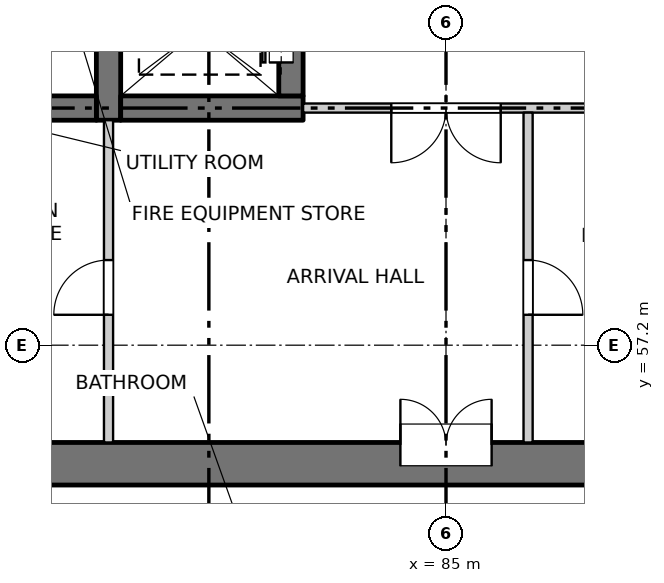
"""IFC4 building model, lengths in metres.
Left out: names, types, materials, properties, quantities, classifications, styles, units other than length and angle.
Written with IfcOpenShell. Run it as: python <this file> out.ifc"""

import sys

from ifc_helpers import new_model, si_unit, direction, frame, frame_2d, origin, place, context, subcontext, project, spatial, rectangle, extrude, element, fill, save


model = new_model("IFC4")
c1 = context("Model", 3, precision=1e-05, world=origin(), true_north=direction((0.0, 1.0)))
c2 = subcontext(c1, "Body", "Model", "MODEL_VIEW")
j1 = project(units=[si_unit("LENGTHUNIT", "METRE"), si_unit("PLANEANGLEUNIT", "RADIAN")], contexts=[c1])
p1 = place(None, origin())
s1 = spatial("IfcSite", under=j1, at=p1, CompositionType="ELEMENT")
p2 = place(p1, origin())
s2 = spatial("IfcBuilding", under=s1, at=p2, CompositionType="ELEMENT")
p3 = place(p2, frame((0.0, 0.0, 29.7)))
s3 = spatial("IfcBuildingStorey", under=s2, at=p3, CompositionType="ELEMENT", Elevation=29.7)
p4 = place(p3, frame((75.6, 55.25, -0.25), z_axis=(0.0, 0.0, 1.0), x_axis=(1.0, 0.0, 0.0)))
e1 = element("IfcWall", 1, at=p4, inside=s3, PredefinedType="SOLIDWALL", context=c2, shape_type="SweptSolid", body=[
    extrude(rectangle(XDim=18.8, YDim=0.7, at=frame_2d((9.4, 0.0))), origin(), (0.0, 0.0, 1.0), 3.4),
])
p5 = place(p4, frame((8.65, 0.0, 0.25)))
e2 = element("IfcOpeningElement", 2, at=p5, cuts=e1, PredefinedType="OPENING", context=c2, shape_type="SweptSolid", body=[
    extrude(rectangle(XDim=1.5, YDim=2.1, at=frame_2d((0.75, 1.05))), frame((0.0, 0.36, 0.0), z_axis=(0.0, -1.0, 0.0), x_axis=(1.0, 0.0, 0.0)), (0.0, 0.0, 1.0), 0.72),
])
p6 = place(p3, frame((79.45, 60.9, -0.25), z_axis=(0.0, 0.0, 1.0), x_axis=(0.0, 1.0, 0.0)))
e3 = element("IfcWall", 3, at=p6, inside=s3, PredefinedType="SOLIDWALL", context=c2, shape_type="SweptSolid", body=[
    extrude(rectangle(XDim=16.4, YDim=0.4, at=frame_2d((8.2, 0.0))), origin(), (0.0, 0.0, 1.0), 3.4),
])
p7 = place(p3, frame((79.65, 61.1, -0.25), z_axis=(0.0, 0.0, 1.0), x_axis=(1.0, 0.0, 0.0)))
e4 = element("IfcWall", 4, at=p7, inside=s3, PredefinedType="SOLIDWALL", context=c2, shape_type="SweptSolid", body=[
    extrude(rectangle(XDim=3.0, YDim=0.4, at=frame_2d((1.5, 0.0))), origin(), (0.0, 0.0, 1.0), 3.4),
])
p8 = place(p3, frame((82.45, 61.3, -0.25), z_axis=(0.0, 0.0, 1.0), x_axis=(0.0, 1.0, 0.0)))
e5 = element("IfcWall", 5, at=p8, inside=s3, PredefinedType="SOLIDWALL", context=c2, shape_type="SweptSolid", body=[
    extrude(rectangle(XDim=2.2, YDim=0.4, at=frame_2d((1.1, 0.0))), origin(), (0.0, 0.0, 1.0), 3.4),
])
p9 = place(p8, frame((0.55, 0.0, 0.25)))
e6 = element("IfcOpeningElement", 6, at=p9, cuts=e5, PredefinedType="OPENING", context=c2, shape_type="SweptSolid", body=[
    extrude(rectangle(XDim=1.1, YDim=2.1, at=frame_2d((0.55, 1.05))), frame((0.0, 0.21, 0.0), z_axis=(0.0, -1.0, 0.0), x_axis=(1.0, 0.0, 0.0)), (0.0, 0.0, 1.0), 0.42),
])
p10 = place(p3, frame((75.6, 61.1, -0.25), z_axis=(0.0, 0.0, 1.0), x_axis=(1.0, 0.0, 0.0)))
e7 = element("IfcWall", 7, at=p10, inside=s3, PredefinedType="SOLIDWALL", context=c2, shape_type="SweptSolid", body=[
    extrude(rectangle(XDim=3.65, YDim=0.4, at=frame_2d((1.825, 0.0))), origin(), (0.0, 0.0, 1.0), 3.4),
])
p11 = place(p3, frame((82.65, 61.1, 0.0), z_axis=(0.0, 0.0, 1.0), x_axis=(1.0, 0.0, 0.0)))
e8 = element("IfcWall", 8, at=p11, inside=s3, PredefinedType="PARTITIONING", context=c2, shape_type="SweptSolid", body=[
    extrude(rectangle(XDim=4.7, YDim=0.15, at=frame_2d((2.35, 0.0))), origin(), (0.0, 0.0, 1.0), 3.15),
])
p12 = place(p11, frame((1.45, 0.0, 0.0)))
e9 = element("IfcOpeningElement", 9, at=p12, cuts=e8, PredefinedType="OPENING", context=c2, shape_type="SweptSolid", body=[
    extrude(rectangle(XDim=1.8, YDim=2.1, at=frame_2d((0.9, 1.05))), frame((0.0, 0.085, 0.0), z_axis=(0.0, -1.0, 0.0), x_axis=(1.0, 0.0, 0.0)), (0.0, 0.0, 1.0), 0.17),
])
p13 = place(p3, frame((79.45, 55.6, 0.0), z_axis=(0.0, 0.0, 1.0), x_axis=(0.0, 1.0, 0.0)))
e10 = element("IfcWall", 10, at=p13, inside=s3, PredefinedType="PARTITIONING", context=c2, shape_type="SweptSolid", body=[
    extrude(rectangle(XDim=5.3, YDim=0.15, at=frame_2d((2.65, 0.0))), origin(), (0.0, 0.0, 1.0), 3.15),
])
p14 = place(p13, frame((2.1, 0.0, 0.0)))
e11 = element("IfcOpeningElement", 11, at=p14, cuts=e10, PredefinedType="OPENING", context=c2, shape_type="SweptSolid", body=[
    extrude(rectangle(XDim=0.9, YDim=2.1, at=frame_2d((0.45, 1.05))), frame((0.0, 0.085, 0.0), z_axis=(0.0, -1.0, 0.0), x_axis=(1.0, 0.0, 0.0)), (0.0, 0.0, 1.0), 0.17),
])
p15 = place(p3, frame((86.35, 55.6, 0.0), z_axis=(0.0, 0.0, 1.0), x_axis=(0.0, 1.0, 0.0)))
e12 = element("IfcWall", 12, at=p15, inside=s3, PredefinedType="PARTITIONING", context=c2, shape_type="SweptSolid", body=[
    extrude(rectangle(XDim=5.425, YDim=0.15, at=frame_2d((2.712, 0.0))), origin(), (0.0, 0.0, 1.0), 3.15),
])
p16 = place(p15, frame((2.1, 0.0, 0.0)))
e13 = element("IfcOpeningElement", 13, at=p16, cuts=e12, PredefinedType="OPENING", context=c2, shape_type="SweptSolid", body=[
    extrude(rectangle(XDim=0.9, YDim=2.1, at=frame_2d((0.45, 1.05))), frame((0.0, 0.085, 0.0), z_axis=(0.0, -1.0, 0.0), x_axis=(1.0, 0.0, 0.0)), (0.0, 0.0, 1.0), 0.17),
])
p17 = place(p5, origin())
e14 = element("IfcDoor", 14, at=p17, inside=s3, OperationType="DOUBLE_DOOR_SINGLE_SWING", PredefinedType="DOOR", context=c2, shape_type="SweptSolid", body=[
    extrude(rectangle(XDim=1.5, YDim=2.1, at=frame_2d((0.75, 1.05))), frame((0.0, 0.335, 0.0), z_axis=(0.0, -1.0, 0.0), x_axis=(1.0, 0.0, 0.0)), (0.0, 0.0, 1.0), 0.05),
])
fill(e2, e14)
p18 = place(p14, origin())
e15 = element("IfcDoor", 15, at=p18, inside=s3, OperationType="SINGLE_SWING_LEFT", PredefinedType="DOOR", context=c2, shape_type="SweptSolid", body=[
    extrude(rectangle(XDim=0.9, YDim=2.1, at=frame_2d((0.45, 1.05))), frame((0.0, 0.025, 0.0), z_axis=(0.0, -1.0, 0.0), x_axis=(1.0, 0.0, 0.0)), (0.0, 0.0, 1.0), 0.05),
])
fill(e11, e15)
p19 = place(p16, origin())
e16 = element("IfcDoor", 16, at=p19, inside=s3, OperationType="SINGLE_SWING_RIGHT", PredefinedType="DOOR", context=c2, shape_type="SweptSolid", body=[
    extrude(rectangle(XDim=0.9, YDim=2.1, at=frame_2d((0.45, 1.05))), frame((0.0, 0.025, 0.0), z_axis=(0.0, -1.0, 0.0), x_axis=(1.0, 0.0, 0.0)), (0.0, 0.0, 1.0), 0.05),
])
fill(e13, e16)
p20 = place(p12, origin())
e17 = element("IfcDoor", 17, at=p20, inside=s3, OperationType="DOUBLE_DOOR_SINGLE_SWING", PredefinedType="DOOR", context=c2, shape_type="SweptSolid", body=[
    extrude(rectangle(XDim=1.8, YDim=2.1, at=frame_2d((0.9, 1.05))), frame((0.0, 0.025, 0.0), z_axis=(0.0, -1.0, 0.0), x_axis=(1.0, 0.0, 0.0)), (0.0, 0.0, 1.0), 0.05),
])
fill(e9, e17)
p21 = place(p9, origin())
e18 = element("IfcDoor", 18, at=p21, inside=s3, OperationType="SLIDING_TO_RIGHT", PredefinedType="DOOR", context=c2, shape_type="SweptSolid", body=[
    extrude(rectangle(XDim=1.1, YDim=2.1, at=frame_2d((0.55, 1.05))), frame((0.0, 0.185, 0.0), z_axis=(0.0, -1.0, 0.0), x_axis=(1.0, 0.0, 0.0)), (0.0, 0.0, 1.0), 0.05),
])
fill(e6, e18)
save(model, sys.argv[1])
